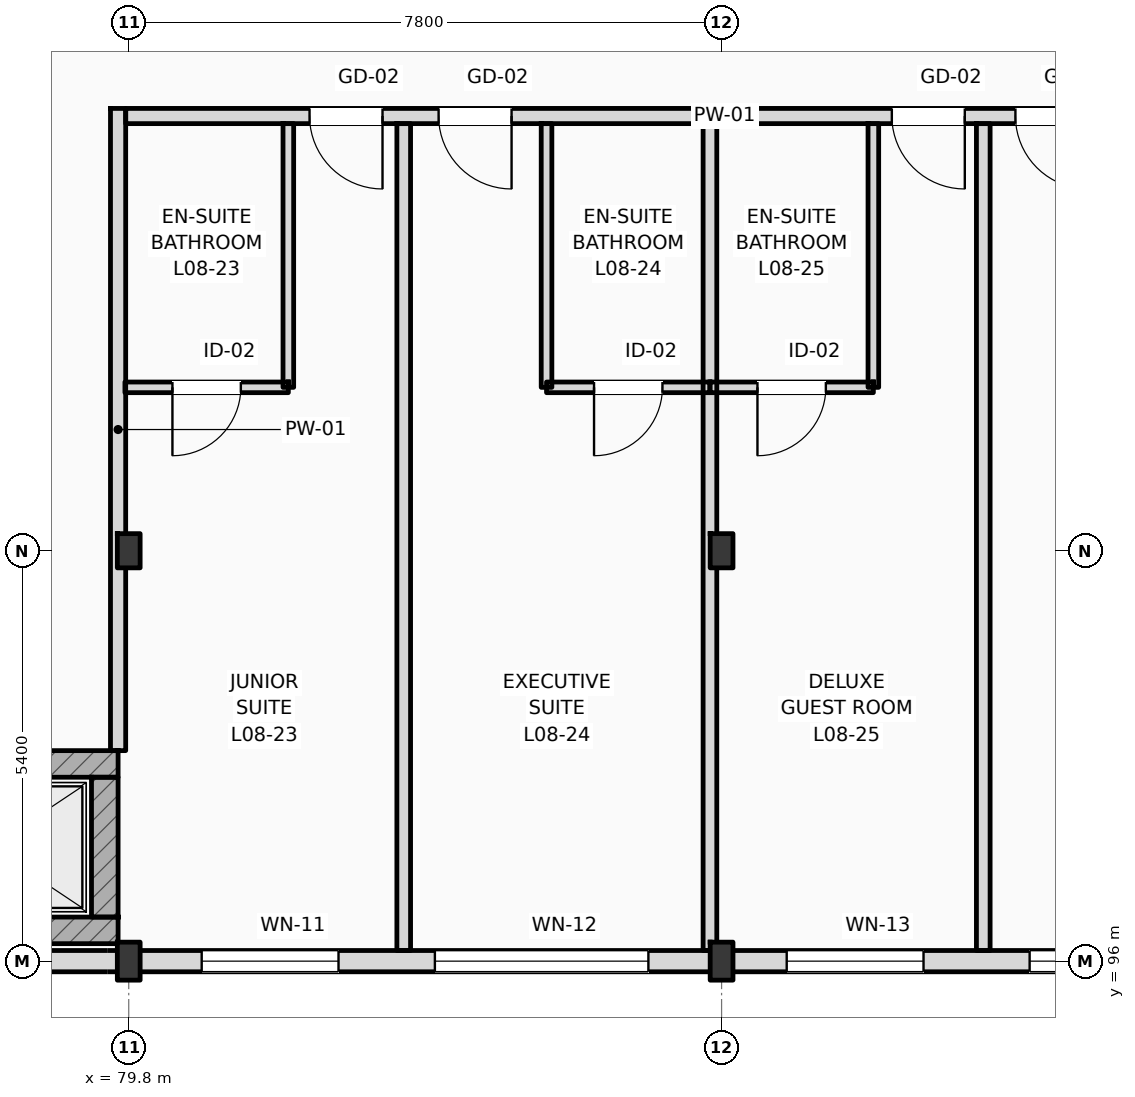
"""IFC4 building model, lengths in metres.
Left out: names, types, materials, properties, quantities, classifications, styles, units other than length and angle.
Written with IfcOpenShell. Run it as: python <this file> out.ifc"""

import sys

from ifc_helpers import new_model, si_unit, direction, frame, frame_2d, origin, origin_2d, place, context, subcontext, project, spatial, rectangle, i_section, extrude, element, fill, save


model = new_model("IFC4")
c1 = context("Model", 3, precision=1e-05, world=origin(), true_north=direction((0.0, 1.0)))
c2 = subcontext(c1, "Body", "Model", "MODEL_VIEW")
j1 = project(units=[si_unit("LENGTHUNIT", "METRE"), si_unit("PLANEANGLEUNIT", "RADIAN")], contexts=[c1])
p1 = place(None, origin())
s1 = spatial("IfcSite", under=j1, at=p1, CompositionType="ELEMENT")
p2 = place(p1, origin())
s2 = spatial("IfcBuilding", under=s1, at=p2, CompositionType="ELEMENT")
p3 = place(p2, frame((0.0, 0.0, 35.4)))
s3 = spatial("IfcBuildingStorey", under=s2, at=p3, CompositionType="ELEMENT", Elevation=35.4)
p4 = place(p3, frame((79.8, 96.0, 0.0), z_axis=(0.0, 0.0, 1.0), x_axis=(1.0, 0.0, 0.0)))
e1 = element("IfcColumn", 1, at=p4, inside=s3, PredefinedType="COLUMN", context=c2, shape_type="SweptSolid", body=[
    extrude(i_section(OverallWidth=0.3, OverallDepth=0.5, WebThickness=0.014, FlangeThickness=0.028, FilletRadius=0.027, at=origin_2d()), origin(), (0.0, 0.0, 1.0), 3.6),
])
p5 = place(p3, frame((79.8, 101.4, 0.0), z_axis=(0.0, 0.0, 1.0), x_axis=(1.0, 0.0, 0.0)))
e2 = element("IfcColumn", 2, at=p5, inside=s3, PredefinedType="COLUMN", context=c2, shape_type="SweptSolid", body=[
    extrude(i_section(OverallWidth=0.3, OverallDepth=0.45, WebThickness=0.014, FlangeThickness=0.026, FilletRadius=0.027, at=origin_2d()), origin(), (0.0, 0.0, 1.0), 3.6),
])
p6 = place(p3, frame((87.6, 96.0, 0.0), z_axis=(0.0, 0.0, 1.0), x_axis=(1.0, 0.0, 0.0)))
e3 = element("IfcColumn", 3, at=p6, inside=s3, PredefinedType="COLUMN", context=c2, shape_type="SweptSolid", body=[
    extrude(i_section(OverallWidth=0.3, OverallDepth=0.5, WebThickness=0.014, FlangeThickness=0.028, FilletRadius=0.027, at=origin_2d()), origin(), (0.0, 0.0, 1.0), 3.6),
])
p7 = place(p3, frame((87.6, 101.4, 0.0), z_axis=(0.0, 0.0, 1.0), x_axis=(1.0, 0.0, 0.0)))
e4 = element("IfcColumn", 4, at=p7, inside=s3, PredefinedType="COLUMN", context=c2, shape_type="SweptSolid", body=[
    extrude(i_section(OverallWidth=0.3, OverallDepth=0.45, WebThickness=0.014, FlangeThickness=0.026, FilletRadius=0.027, at=origin_2d()), origin(), (0.0, 0.0, 1.0), 3.6),
])
p8 = place(p3, frame((25.2, 96.0, 0.0), z_axis=(0.0, 0.0, 1.0), x_axis=(1.0, 0.0, 0.0)))
e5 = element("IfcWall", 5, at=p8, inside=s3, PredefinedType="STANDARD", context=c2, shape_type="SweptSolid", body=[
    extrude(rectangle(XDim=70.2, YDim=0.28, at=frame_2d((35.1, 0.0))), origin(), (0.0, 0.0, 1.0), 2.92),
])
p9 = place(p8, frame((16.694, 0.0, 0.9)))
e6 = element("IfcOpeningElement", 6, at=p9, cuts=e5, PredefinedType="OPENING", context=c2, shape_type="SweptSolid", body=[
    extrude(rectangle(XDim=1.8, YDim=1.84, at=frame_2d((0.9, 0.92))), frame((0.0, 0.15, 0.0), z_axis=(0.0, -1.0, 0.0), x_axis=(1.0, 0.0, 0.0)), (0.0, 0.0, 1.0), 0.3),
])
p10 = place(p8, frame((20.482, 0.0, 0.9)))
e7 = element("IfcOpeningElement", 7, at=p10, cuts=e5, PredefinedType="OPENING", context=c2, shape_type="SweptSolid", body=[
    extrude(rectangle(XDim=1.95, YDim=1.84, at=frame_2d((0.975, 0.92))), frame((0.0, 0.15, 0.0), z_axis=(0.0, -1.0, 0.0), x_axis=(1.0, 0.0, 0.0)), (0.0, 0.0, 1.0), 0.3),
])
p11 = place(p8, frame((24.316, 0.0, 0.9)))
e8 = element("IfcOpeningElement", 8, at=p11, cuts=e5, PredefinedType="OPENING", context=c2, shape_type="SweptSolid", body=[
    extrude(rectangle(XDim=2.1, YDim=1.84, at=frame_2d((1.05, 0.92))), frame((0.0, 0.15, 0.0), z_axis=(0.0, -1.0, 0.0), x_axis=(1.0, 0.0, 0.0)), (0.0, 0.0, 1.0), 0.3),
])
p12 = place(p8, frame((28.149, 0.0, 0.9)))
e9 = element("IfcOpeningElement", 9, at=p12, cuts=e5, PredefinedType="OPENING", context=c2, shape_type="SweptSolid", body=[
    extrude(rectangle(XDim=2.25, YDim=1.84, at=frame_2d((1.125, 0.92))), frame((0.0, 0.15, 0.0), z_axis=(0.0, -1.0, 0.0), x_axis=(1.0, 0.0, 0.0)), (0.0, 0.0, 1.0), 0.3),
])
p13 = place(p8, frame((31.983, 0.0, 0.9)))
e10 = element("IfcOpeningElement", 10, at=p13, cuts=e5, PredefinedType="OPENING", context=c2, shape_type="SweptSolid", body=[
    extrude(rectangle(XDim=2.4, YDim=1.84, at=frame_2d((1.2, 0.92))), frame((0.0, 0.15, 0.0), z_axis=(0.0, -1.0, 0.0), x_axis=(1.0, 0.0, 0.0)), (0.0, 0.0, 1.0), 0.3),
])
p14 = place(p8, frame((35.682, 0.0, 0.9)))
e11 = element("IfcOpeningElement", 11, at=p14, cuts=e5, PredefinedType="OPENING", context=c2, shape_type="SweptSolid", body=[
    extrude(rectangle(XDim=2.508, YDim=1.84, at=frame_2d((1.254, 0.92))), frame((0.0, 0.15, 0.0), z_axis=(0.0, -1.0, 0.0), x_axis=(1.0, 0.0, 0.0)), (0.0, 0.0, 1.0), 0.3),
])
p15 = place(p8, frame((55.56, 0.0, 0.9)))
e12 = element("IfcOpeningElement", 12, at=p15, cuts=e5, PredefinedType="OPENING", context=c2, shape_type="SweptSolid", body=[
    extrude(rectangle(XDim=1.8, YDim=1.84, at=frame_2d((0.9, 0.92))), frame((0.0, 0.15, 0.0), z_axis=(0.0, -1.0, 0.0), x_axis=(1.0, 0.0, 0.0)), (0.0, 0.0, 1.0), 0.3),
])
p16 = place(p8, frame((58.628, 0.0, 0.9)))
e13 = element("IfcOpeningElement", 13, at=p16, cuts=e5, PredefinedType="OPENING", context=c2, shape_type="SweptSolid", body=[
    extrude(rectangle(XDim=2.809, YDim=1.84, at=frame_2d((1.405, 0.92))), frame((0.0, 0.15, 0.0), z_axis=(0.0, -1.0, 0.0), x_axis=(1.0, 0.0, 0.0)), (0.0, 0.0, 1.0), 0.3),
])
p17 = place(p8, frame((63.257, 0.0, 0.9)))
e14 = element("IfcOpeningElement", 14, at=p17, cuts=e5, PredefinedType="OPENING", context=c2, shape_type="SweptSolid", body=[
    extrude(rectangle(XDim=1.8, YDim=1.84, at=frame_2d((0.9, 0.92))), frame((0.0, 0.15, 0.0), z_axis=(0.0, -1.0, 0.0), x_axis=(1.0, 0.0, 0.0)), (0.0, 0.0, 1.0), 0.3),
])
p18 = place(p8, frame((66.453, 0.0, 0.9)))
e15 = element("IfcOpeningElement", 15, at=p18, cuts=e5, PredefinedType="OPENING", context=c2, shape_type="SweptSolid", body=[
    extrude(rectangle(XDim=2.737, YDim=1.84, at=frame_2d((1.369, 0.92))), frame((0.0, 0.15, 0.0), z_axis=(0.0, -1.0, 0.0), x_axis=(1.0, 0.0, 0.0)), (0.0, 0.0, 1.0), 0.3),
])
p19 = place(p3, frame((76.67, 98.595, 0.0), z_axis=(0.0, 0.0, 1.0), x_axis=(1.0, 0.0, 0.0)))
e16 = element("IfcWall", 16, at=p19, inside=s3, PredefinedType="SHEAR", context=c2, shape_type="SweptSolid", body=[
    extrude(rectangle(XDim=2.99, YDim=0.35, at=frame_2d((1.495, 0.0))), origin(), (0.0, 0.0, 1.0), 3.38),
])
p20 = place(p19, frame((0.695, 0.0, 0.0)))
e17 = element("IfcOpeningElement", 17, at=p20, cuts=e16, PredefinedType="OPENING", context=c2, shape_type="SweptSolid", body=[
    extrude(rectangle(XDim=1.25, YDim=2.25, at=frame_2d((0.625, 1.125))), frame((0.0, 0.185, 0.0), z_axis=(0.0, -1.0, 0.0), x_axis=(1.0, 0.0, 0.0)), (0.0, 0.0, 1.0), 0.37),
])
p21 = place(p3, frame((76.67, 96.405, 0.0), z_axis=(0.0, 0.0, 1.0), x_axis=(1.0, 0.0, 0.0)))
e18 = element("IfcWall", 18, at=p21, inside=s3, PredefinedType="SHEAR", context=c2, shape_type="SweptSolid", body=[
    extrude(rectangle(XDim=2.99, YDim=0.35, at=frame_2d((1.495, 0.0))), origin(), (0.0, 0.0, 1.0), 3.38),
])
p22 = place(p3, frame((79.485, 96.58, 0.0), z_axis=(0.0, 0.0, 1.0), x_axis=(0.0, 1.0, 0.0)))
e19 = element("IfcWall", 19, at=p22, inside=s3, PredefinedType="SHEAR", context=c2, shape_type="SweptSolid", body=[
    extrude(rectangle(XDim=1.84, YDim=0.35, at=frame_2d((0.92, 0.0))), origin(), (0.0, 0.0, 1.0), 3.01),
])
p23 = place(p3, frame((79.76, 107.12, 0.0), z_axis=(0.0, 0.0, 1.0), x_axis=(1.0, 0.0, 0.0)))
e20 = element("IfcWall", 20, at=p23, inside=s3, PredefinedType="PARTITIONING", context=c2, shape_type="SweptSolid", body=[
    extrude(rectangle(XDim=15.5, YDim=0.2, at=frame_2d((7.75, 0.0))), origin(), (0.0, 0.0, 1.0), 3.38),
])
p24 = place(p23, frame((2.419, 0.0, 0.0)))
e21 = element("IfcOpeningElement", 21, at=p24, cuts=e20, PredefinedType="OPENING", context=c2, shape_type="SweptSolid", body=[
    extrude(rectangle(XDim=0.96, YDim=2.2, at=frame_2d((0.48, 1.1))), frame((0.0, 0.11, 0.0), z_axis=(0.0, -1.0, 0.0), x_axis=(1.0, 0.0, 0.0)), (0.0, 0.0, 1.0), 0.22),
])
p25 = place(p23, frame((4.117, 0.0, 0.0)))
e22 = element("IfcOpeningElement", 22, at=p25, cuts=e20, PredefinedType="OPENING", context=c2, shape_type="SweptSolid", body=[
    extrude(rectangle(XDim=0.96, YDim=2.2, at=frame_2d((0.48, 1.1))), frame((0.0, 0.11, 0.0), z_axis=(0.0, -1.0, 0.0), x_axis=(1.0, 0.0, 0.0)), (0.0, 0.0, 1.0), 0.22),
])
p26 = place(p23, frame((10.08, 0.0, 0.0)))
e23 = element("IfcOpeningElement", 23, at=p26, cuts=e20, PredefinedType="OPENING", context=c2, shape_type="SweptSolid", body=[
    extrude(rectangle(XDim=0.96, YDim=2.2, at=frame_2d((0.48, 1.1))), frame((0.0, 0.11, 0.0), z_axis=(0.0, -1.0, 0.0), x_axis=(1.0, 0.0, 0.0)), (0.0, 0.0, 1.0), 0.22),
])
p27 = place(p23, frame((11.706, 0.0, 0.0)))
e24 = element("IfcOpeningElement", 24, at=p27, cuts=e20, PredefinedType="OPENING", context=c2, shape_type="SweptSolid", body=[
    extrude(rectangle(XDim=0.96, YDim=2.2, at=frame_2d((0.48, 1.1))), frame((0.0, 0.11, 0.0), z_axis=(0.0, -1.0, 0.0), x_axis=(1.0, 0.0, 0.0)), (0.0, 0.0, 1.0), 0.22),
])
p28 = place(p3, frame((79.66, 98.77, 0.0), z_axis=(0.0, 0.0, 1.0), x_axis=(0.0, 1.0, 0.0)))
e25 = element("IfcWall", 25, at=p28, inside=s3, PredefinedType="PARTITIONING", context=c2, shape_type="SweptSolid", body=[
    extrude(rectangle(XDim=8.45, YDim=0.2, at=frame_2d((4.225, 0.0))), origin(), (0.0, 0.0, 1.0), 3.01),
])
p29 = place(p3, frame((83.418, 96.14, 0.0), z_axis=(0.0, 0.0, 1.0), x_axis=(0.0, 1.0, 0.0)))
e26 = element("IfcWall", 26, at=p29, inside=s3, PredefinedType="PARTITIONING", context=c2, shape_type="SweptSolid", body=[
    extrude(rectangle(XDim=10.88, YDim=0.18, at=frame_2d((5.44, 0.0))), origin(), (0.0, 0.0, 1.0), 3.38),
])
p30 = place(p3, frame((81.9, 103.55, 0.0), z_axis=(0.0, 0.0, 1.0), x_axis=(0.0, 1.0, 0.0)))
e27 = element("IfcWall", 27, at=p30, inside=s3, PredefinedType="PARTITIONING", context=c2, shape_type="SweptSolid", body=[
    extrude(rectangle(XDim=3.47, YDim=0.14, at=frame_2d((1.735, 0.0))), origin(), (0.0, 0.0, 1.0), 3.38),
])
p31 = place(p3, frame((79.75, 103.55, 0.0), z_axis=(0.0, 0.0, 1.0), x_axis=(1.0, 0.0, 0.0)))
e28 = element("IfcWall", 28, at=p31, inside=s3, PredefinedType="PARTITIONING", context=c2, shape_type="SweptSolid", body=[
    extrude(rectangle(XDim=2.15, YDim=0.14, at=frame_2d((1.075, 0.0))), origin(), (0.0, 0.0, 1.0), 3.38),
])
p32 = place(p31, frame((0.625, 0.0, 0.0)))
e29 = element("IfcOpeningElement", 29, at=p32, cuts=e28, PredefinedType="OPENING", context=c2, shape_type="SweptSolid", body=[
    extrude(rectangle(XDim=0.9, YDim=2.1, at=frame_2d((0.45, 1.05))), frame((0.0, 0.08, 0.0), z_axis=(0.0, -1.0, 0.0), x_axis=(1.0, 0.0, 0.0)), (0.0, 0.0, 1.0), 0.16),
])
p33 = place(p3, frame((87.447, 96.14, 0.0), z_axis=(0.0, 0.0, 1.0), x_axis=(0.0, 1.0, 0.0)))
e30 = element("IfcWall", 30, at=p33, inside=s3, PredefinedType="PARTITIONING", context=c2, shape_type="SweptSolid", body=[
    extrude(rectangle(XDim=10.88, YDim=0.18, at=frame_2d((5.44, 0.0))), origin(), (0.0, 0.0, 1.0), 3.01),
])
p34 = place(p3, frame((85.297, 103.55, 0.0), z_axis=(0.0, 0.0, 1.0), x_axis=(0.0, 1.0, 0.0)))
e31 = element("IfcWall", 31, at=p34, inside=s3, PredefinedType="PARTITIONING", context=c2, shape_type="SweptSolid", body=[
    extrude(rectangle(XDim=3.47, YDim=0.14, at=frame_2d((1.735, 0.0))), origin(), (0.0, 0.0, 1.0), 3.38),
])
p35 = place(p3, frame((85.297, 103.55, 0.0), z_axis=(0.0, 0.0, 1.0), x_axis=(1.0, 0.0, 0.0)))
e32 = element("IfcWall", 32, at=p35, inside=s3, PredefinedType="PARTITIONING", context=c2, shape_type="SweptSolid", body=[
    extrude(rectangle(XDim=2.15, YDim=0.14, at=frame_2d((1.075, 0.0))), origin(), (0.0, 0.0, 1.0), 3.38),
])
p36 = place(p35, frame((0.625, 0.0, 0.0)))
e33 = element("IfcOpeningElement", 33, at=p36, cuts=e32, PredefinedType="OPENING", context=c2, shape_type="SweptSolid", body=[
    extrude(rectangle(XDim=0.9, YDim=2.1, at=frame_2d((0.45, 1.05))), frame((0.0, 0.08, 0.0), z_axis=(0.0, -1.0, 0.0), x_axis=(1.0, 0.0, 0.0)), (0.0, 0.0, 1.0), 0.16),
])
p37 = place(p3, frame((91.043, 96.14, 0.0), z_axis=(0.0, 0.0, 1.0), x_axis=(0.0, 1.0, 0.0)))
e34 = element("IfcWall", 34, at=p37, inside=s3, PredefinedType="PARTITIONING", context=c2, shape_type="SweptSolid", body=[
    extrude(rectangle(XDim=10.88, YDim=0.18, at=frame_2d((5.44, 0.0))), origin(), (0.0, 0.0, 1.0), 3.38),
])
p38 = place(p3, frame((89.597, 103.55, 0.0), z_axis=(0.0, 0.0, 1.0), x_axis=(0.0, 1.0, 0.0)))
e35 = element("IfcWall", 35, at=p38, inside=s3, PredefinedType="PARTITIONING", context=c2, shape_type="SweptSolid", body=[
    extrude(rectangle(XDim=3.47, YDim=0.14, at=frame_2d((1.735, 0.0))), origin(), (0.0, 0.0, 1.0), 3.38),
])
p39 = place(p3, frame((87.447, 103.55, 0.0), z_axis=(0.0, 0.0, 1.0), x_axis=(1.0, 0.0, 0.0)))
e36 = element("IfcWall", 36, at=p39, inside=s3, PredefinedType="PARTITIONING", context=c2, shape_type="SweptSolid", body=[
    extrude(rectangle(XDim=2.15, YDim=0.14, at=frame_2d((1.075, 0.0))), origin(), (0.0, 0.0, 1.0), 3.38),
])
p40 = place(p39, frame((0.625, 0.0, 0.0)))
e37 = element("IfcOpeningElement", 37, at=p40, cuts=e36, PredefinedType="OPENING", context=c2, shape_type="SweptSolid", body=[
    extrude(rectangle(XDim=0.9, YDim=2.1, at=frame_2d((0.45, 1.05))), frame((0.0, 0.08, 0.0), z_axis=(0.0, -1.0, 0.0), x_axis=(1.0, 0.0, 0.0)), (0.0, 0.0, 1.0), 0.16),
])
p41 = place(p15, origin())
e38 = element("IfcWindow", 38, at=p41, inside=s3, PartitioningType="DOUBLE_PANEL_VERTICAL", PredefinedType="WINDOW", context=c2, shape_type="SweptSolid", body=[
    extrude(rectangle(XDim=1.8, YDim=1.84, at=frame_2d((0.9, 0.92))), frame((0.0, 0.03, 0.0), z_axis=(0.0, -1.0, 0.0), x_axis=(1.0, 0.0, 0.0)), (0.0, 0.0, 1.0), 0.06),
])
fill(e12, e38)
p42 = place(p16, origin())
e39 = element("IfcWindow", 39, at=p42, inside=s3, PartitioningType="DOUBLE_PANEL_VERTICAL", PredefinedType="WINDOW", context=c2, shape_type="SweptSolid", body=[
    extrude(rectangle(XDim=2.809, YDim=1.84, at=frame_2d((1.405, 0.92))), frame((0.0, 0.03, 0.0), z_axis=(0.0, -1.0, 0.0), x_axis=(1.0, 0.0, 0.0)), (0.0, 0.0, 1.0), 0.06),
])
fill(e13, e39)
p43 = place(p17, origin())
e40 = element("IfcWindow", 40, at=p43, inside=s3, PartitioningType="DOUBLE_PANEL_VERTICAL", PredefinedType="WINDOW", context=c2, shape_type="SweptSolid", body=[
    extrude(rectangle(XDim=1.8, YDim=1.84, at=frame_2d((0.9, 0.92))), frame((0.0, 0.03, 0.0), z_axis=(0.0, -1.0, 0.0), x_axis=(1.0, 0.0, 0.0)), (0.0, 0.0, 1.0), 0.06),
])
fill(e14, e40)
p44 = place(p18, origin())
e41 = element("IfcWindow", 41, at=p44, inside=s3, PartitioningType="DOUBLE_PANEL_VERTICAL", PredefinedType="WINDOW", context=c2, shape_type="SweptSolid", body=[
    extrude(rectangle(XDim=2.737, YDim=1.84, at=frame_2d((1.369, 0.92))), frame((0.0, 0.03, 0.0), z_axis=(0.0, -1.0, 0.0), x_axis=(1.0, 0.0, 0.0)), (0.0, 0.0, 1.0), 0.06),
])
fill(e15, e41)
p45 = place(p24, frame((0.96, 0.0, 0.0), z_axis=(0.0, 0.0, 1.0), x_axis=(-1.0, 0.0, 0.0)))
e42 = element("IfcDoor", 42, at=p45, inside=s3, OperationType="SINGLE_SWING_RIGHT", PredefinedType="DOOR", context=c2, shape_type="SweptSolid", body=[
    extrude(rectangle(XDim=0.96, YDim=2.2, at=frame_2d((0.48, 1.1))), frame((0.0, 0.025, 0.0), z_axis=(0.0, -1.0, 0.0), x_axis=(1.0, 0.0, 0.0)), (0.0, 0.0, 1.0), 0.05),
])
fill(e21, e42)
p46 = place(p32, frame((0.9, 0.0, 0.0), z_axis=(0.0, 0.0, 1.0), x_axis=(-1.0, 0.0, 0.0)))
e43 = element("IfcDoor", 43, at=p46, inside=s3, OperationType="SINGLE_SWING_LEFT", PredefinedType="DOOR", context=c2, shape_type="SweptSolid", body=[
    extrude(rectangle(XDim=0.9, YDim=2.1, at=frame_2d((0.45, 1.05))), frame((0.0, 0.025, 0.0), z_axis=(0.0, -1.0, 0.0), x_axis=(1.0, 0.0, 0.0)), (0.0, 0.0, 1.0), 0.05),
])
fill(e29, e43)
p47 = place(p25, frame((0.96, 0.0, 0.0), z_axis=(0.0, 0.0, 1.0), x_axis=(-1.0, 0.0, 0.0)))
e44 = element("IfcDoor", 44, at=p47, inside=s3, OperationType="SINGLE_SWING_RIGHT", PredefinedType="DOOR", context=c2, shape_type="SweptSolid", body=[
    extrude(rectangle(XDim=0.96, YDim=2.2, at=frame_2d((0.48, 1.1))), frame((0.0, 0.025, 0.0), z_axis=(0.0, -1.0, 0.0), x_axis=(1.0, 0.0, 0.0)), (0.0, 0.0, 1.0), 0.05),
])
fill(e22, e44)
p48 = place(p36, frame((0.9, 0.0, 0.0), z_axis=(0.0, 0.0, 1.0), x_axis=(-1.0, 0.0, 0.0)))
e45 = element("IfcDoor", 45, at=p48, inside=s3, OperationType="SINGLE_SWING_LEFT", PredefinedType="DOOR", context=c2, shape_type="SweptSolid", body=[
    extrude(rectangle(XDim=0.9, YDim=2.1, at=frame_2d((0.45, 1.05))), frame((0.0, 0.025, 0.0), z_axis=(0.0, -1.0, 0.0), x_axis=(1.0, 0.0, 0.0)), (0.0, 0.0, 1.0), 0.05),
])
fill(e33, e45)
p49 = place(p26, frame((0.96, 0.0, 0.0), z_axis=(0.0, 0.0, 1.0), x_axis=(-1.0, 0.0, 0.0)))
e46 = element("IfcDoor", 46, at=p49, inside=s3, OperationType="SINGLE_SWING_RIGHT", PredefinedType="DOOR", context=c2, shape_type="SweptSolid", body=[
    extrude(rectangle(XDim=0.96, YDim=2.2, at=frame_2d((0.48, 1.1))), frame((0.0, 0.025, 0.0), z_axis=(0.0, -1.0, 0.0), x_axis=(1.0, 0.0, 0.0)), (0.0, 0.0, 1.0), 0.05),
])
fill(e23, e46)
p50 = place(p40, frame((0.9, 0.0, 0.0), z_axis=(0.0, 0.0, 1.0), x_axis=(-1.0, 0.0, 0.0)))
e47 = element("IfcDoor", 47, at=p50, inside=s3, OperationType="SINGLE_SWING_LEFT", PredefinedType="DOOR", context=c2, shape_type="SweptSolid", body=[
    extrude(rectangle(XDim=0.9, YDim=2.1, at=frame_2d((0.45, 1.05))), frame((0.0, 0.025, 0.0), z_axis=(0.0, -1.0, 0.0), x_axis=(1.0, 0.0, 0.0)), (0.0, 0.0, 1.0), 0.05),
])
fill(e37, e47)
p51 = place(p27, frame((0.96, 0.0, 0.0), z_axis=(0.0, 0.0, 1.0), x_axis=(-1.0, 0.0, 0.0)))
e48 = element("IfcDoor", 48, at=p51, inside=s3, OperationType="SINGLE_SWING_RIGHT", PredefinedType="DOOR", context=c2, shape_type="SweptSolid", body=[
    extrude(rectangle(XDim=0.96, YDim=2.2, at=frame_2d((0.48, 1.1))), frame((0.0, 0.025, 0.0), z_axis=(0.0, -1.0, 0.0), x_axis=(1.0, 0.0, 0.0)), (0.0, 0.0, 1.0), 0.05),
])
fill(e24, e48)
save(model, sys.argv[1])
